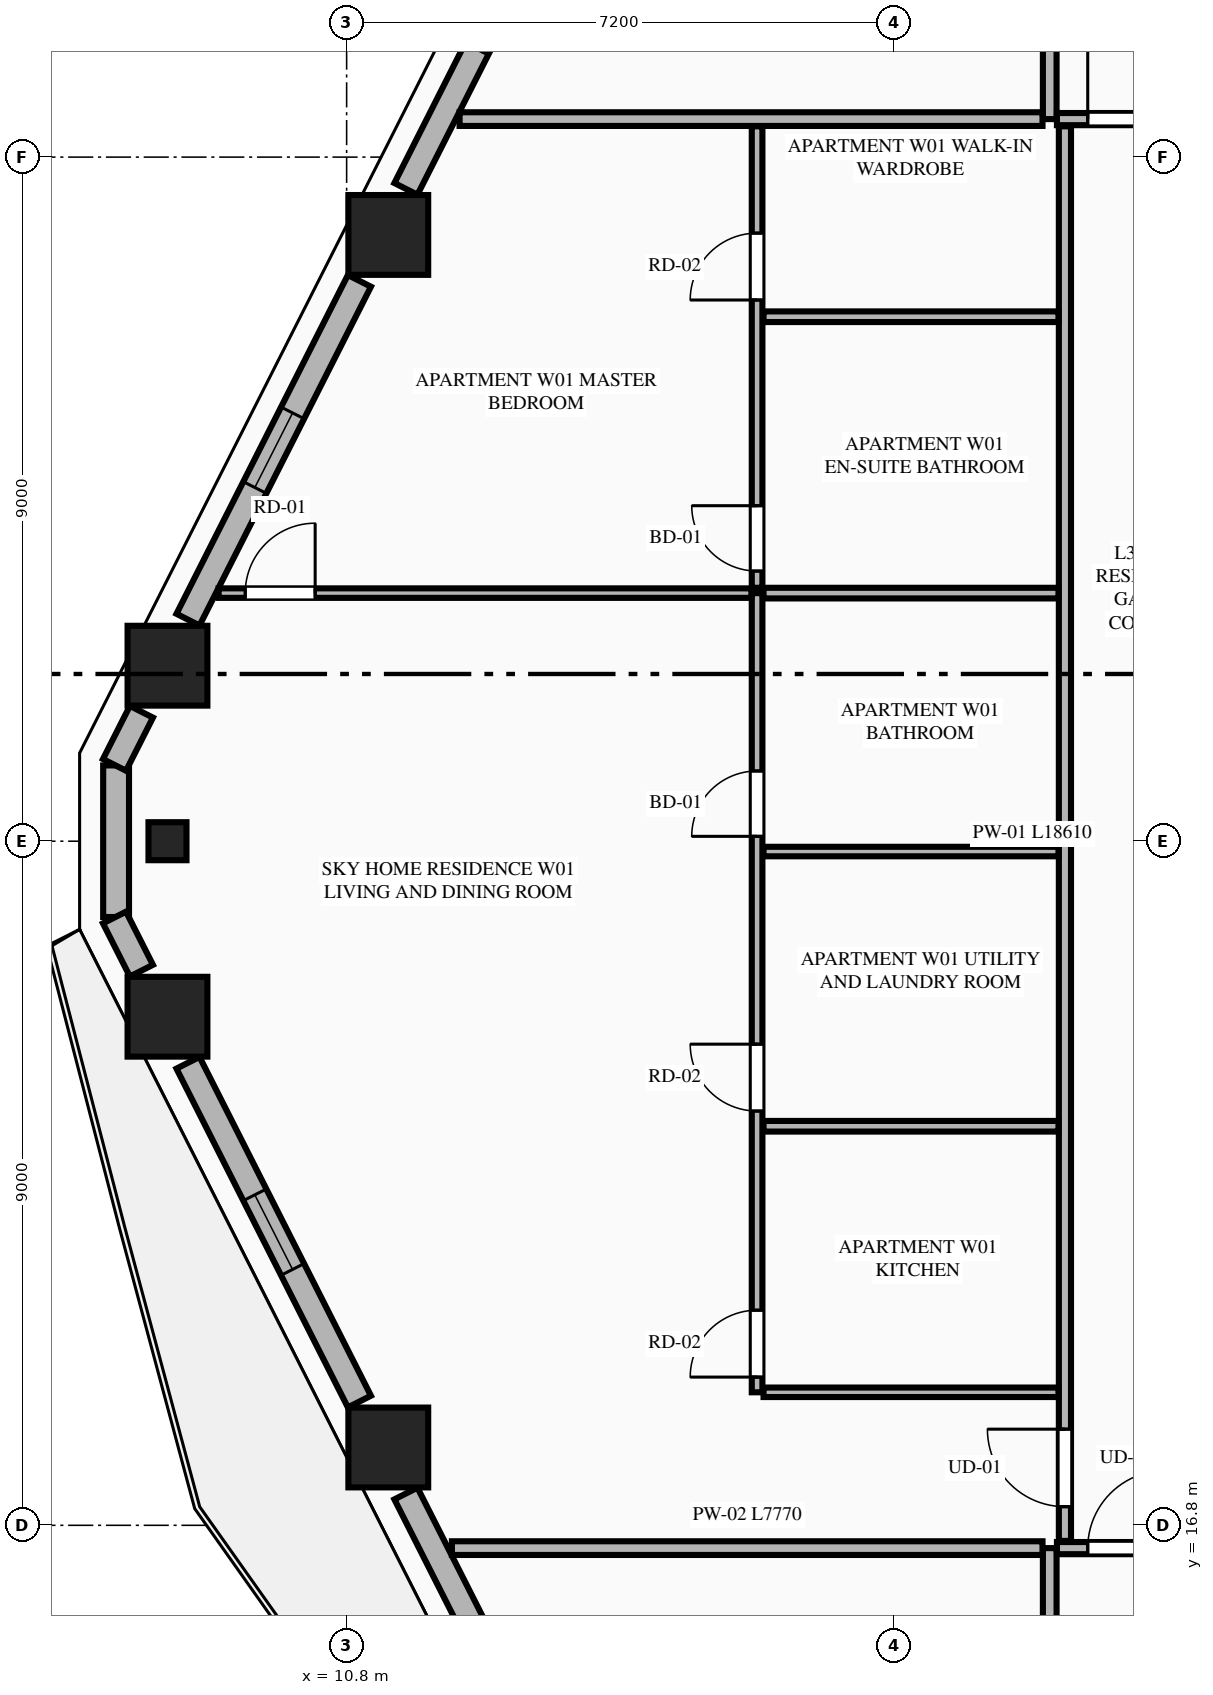
"""IFC4 building model, lengths in metres.
Left out: names, types, materials, properties, quantities, classifications, styles, units other than length and angle.
Written with IfcOpenShell. Run it as: python <this file> out.ifc"""

import sys

from ifc_helpers import new_model, si_unit, direction, frame, frame_2d, origin, origin_2d, place, context, subcontext, project, spatial, rectangle, extrude, element, fill, save


model = new_model("IFC4")
c1 = context("Model", 3, precision=1e-05, world=origin(), true_north=direction((0.0, 1.0)))
c2 = subcontext(c1, "Body", "Model", "MODEL_VIEW")
j1 = project(units=[si_unit("LENGTHUNIT", "METRE"), si_unit("PLANEANGLEUNIT", "RADIAN")], contexts=[c1])
p1 = place(None, origin())
s1 = spatial("IfcSite", under=j1, at=p1, CompositionType="ELEMENT")
p2 = place(p1, origin())
s2 = spatial("IfcBuilding", under=s1, at=p2, CompositionType="ELEMENT")
p3 = place(p2, frame((0.0, 0.0, 130.35)))
s3 = spatial("IfcBuildingStorey", under=s2, at=p3, CompositionType="ELEMENT", Elevation=130.35)
for number, where, z_axis, x_axis in (
    (1, (11.348, 33.776, 0.0), (0.0, 0.0, 1.0), (1.0, 0.0, 0.0)),
    (2, (8.443, 28.109, 0.0), (0.0, 0.0, 1.0), (1.0, 0.0, 0.0)),
    (3, (8.443, 23.491, 0.0), (0.0, 0.0, 1.0), (1.0, 0.0, 0.0)),
    (4, (11.348, 17.824, 0.0), (0.0, 0.0, 1.0), (1.0, 0.0, 0.0)),
):
    element("IfcColumn", number, at=place(p3, frame(where, z_axis=z_axis, x_axis=x_axis)), inside=s3, PredefinedType="COLUMN", context=c2, shape_type="SweptSolid", body=[
        extrude(rectangle(XDim=1.05, YDim=1.05, at=origin_2d()), origin(), (0.0, 0.0, 1.0), 3.55),
    ])
p4 = place(p3, frame((8.443, 25.8, 0.0), z_axis=(0.0, 0.0, 1.0), x_axis=(0.0, -1.0, 0.0)))
e5 = element("IfcColumn", 5, at=p4, inside=s3, PredefinedType="PILASTER", context=c2, shape_type="SweptSolid", body=[
    extrude(rectangle(XDim=0.5, YDim=0.35, at=origin_2d()), origin(), (0.0, 0.0, 1.0), 3.55),
])
p5 = place(p3, frame((7.767, 26.797, 0.0), z_axis=(0.0, 0.0, 1.0), x_axis=(0.0, -1.0, 0.0)))
e6 = element("IfcWall", 6, at=p5, inside=s3, PredefinedType="STANDARD", context=c2, shape_type="SweptSolid", body=[
    extrude(rectangle(XDim=1.994, YDim=0.34, at=frame_2d((0.997, 0.0))), origin(), (0.0, 0.0, 1.0), 3.34),
])
p6 = place(p3, frame((13.937, 39.039, 0.0), z_axis=(0.0, 0.0, 1.0), x_axis=(-0.451567731634, -0.892236842855, 0.0)))
e7 = element("IfcWall", 7, at=p6, inside=s3, PredefinedType="STANDARD", context=c2, shape_type="SweptSolid", body=[
    extrude(rectangle(XDim=5.219, YDim=0.34, at=frame_2d((2.61, 0.0))), origin(), (0.0, 0.0, 1.0), 2.797),
])
p7 = place(p6, frame((2.06, 0.0, 0.75)))
e8 = element("IfcOpeningElement", 8, at=p7, cuts=e7, PredefinedType="OPENING", context=c2, shape_type="SweptSolid", body=[
    extrude(rectangle(XDim=1.1, YDim=1.897, at=frame_2d((0.55, 0.948))), frame((0.0, 0.18, 0.0), z_axis=(0.0, -1.0, 0.0), x_axis=(1.0, 0.0, 0.0)), (0.0, 0.0, 1.0), 0.36),
])
p8 = place(p3, frame((10.968, 33.172, 0.0), z_axis=(0.0, 0.0, 1.0), x_axis=(-0.451470533039, -0.892286029139, 0.0)))
e9 = element("IfcWall", 9, at=p8, inside=s3, PredefinedType="STANDARD", context=c2, shape_type="SweptSolid", body=[
    extrude(rectangle(XDim=4.995, YDim=0.34, at=frame_2d((2.498, 0.0))), origin(), (0.0, 0.0, 1.0), 2.797),
])
p9 = place(p8, frame((1.947, 0.0, 0.75)))
e10 = element("IfcOpeningElement", 10, at=p9, cuts=e9, PredefinedType="OPENING", context=c2, shape_type="SweptSolid", body=[
    extrude(rectangle(XDim=1.1, YDim=1.897, at=frame_2d((0.55, 0.948))), frame((0.0, 0.18, 0.0), z_axis=(0.0, -1.0, 0.0), x_axis=(1.0, 0.0, 0.0)), (0.0, 0.0, 1.0), 0.36),
])
for number, where, z_axis, x_axis in (
    (11, (8.1, 27.503, 0.0), (0.0, 0.0, 1.0), (-0.452, -0.892, 0.0)),
    (12, (7.746, 24.796, 0.0), (0.0, 0.0, 1.0), (0.452, -0.892, 0.0)),
):
    element("IfcWall", number, at=place(p3, frame(where, z_axis=z_axis, x_axis=x_axis)), inside=s3, PredefinedType="STANDARD", context=c2, shape_type="SweptSolid", body=[
        extrude(rectangle(XDim=0.783, YDim=0.34, at=frame_2d((0.392, 0.0))), origin(), (0.0, 0.0, 1.0), 3.34),
    ])
p10 = place(p3, frame((8.713, 22.885, 0.0), z_axis=(0.0, 0.0, 1.0), x_axis=(0.451470533039, -0.892286029139, 0.0)))
e13 = element("IfcWall", 13, at=p10, inside=s3, PredefinedType="STANDARD", context=c2, shape_type="SweptSolid", body=[
    extrude(rectangle(XDim=4.995, YDim=0.34, at=frame_2d((2.498, 0.0))), origin(), (0.0, 0.0, 1.0), 2.797),
])
p11 = place(p10, frame((1.947, 0.0, 0.75)))
e14 = element("IfcOpeningElement", 14, at=p11, cuts=e13, PredefinedType="OPENING", context=c2, shape_type="SweptSolid", body=[
    extrude(rectangle(XDim=1.1, YDim=1.897, at=frame_2d((0.55, 0.948))), frame((0.0, 0.18, 0.0), z_axis=(0.0, -1.0, 0.0), x_axis=(1.0, 0.0, 0.0)), (0.0, 0.0, 1.0), 0.36),
])
p12 = place(p3, frame((11.58, 17.218, 0.0), z_axis=(0.0, 0.0, 1.0), x_axis=(0.451567731634, -0.892236842855, 0.0)))
e15 = element("IfcWall", 15, at=p12, inside=s3, PredefinedType="STANDARD", context=c2, shape_type="SweptSolid", body=[
    extrude(rectangle(XDim=5.219, YDim=0.34, at=frame_2d((2.61, 0.0))), origin(), (0.0, 0.0, 1.0), 2.797),
])
p13 = place(p12, frame((2.587, 0.0, 0.0)))
e16 = element("IfcOpeningElement", 16, at=p13, cuts=e15, PredefinedType="OPENING", context=c2, shape_type="SweptSolid", body=[
    extrude(rectangle(XDim=1.1, YDim=2.25, at=frame_2d((0.55, 1.125))), frame((0.0, 0.18, 0.0), z_axis=(0.0, -1.0, 0.0), x_axis=(1.0, 0.0, 0.0)), (0.0, 0.0, 1.0), 0.36),
])
p14 = place(p3, frame((20.05, 4.105, 0.0), z_axis=(0.0, 0.0, 1.0), x_axis=(0.0, 1.0, 0.0)))
e17 = element("IfcWall", 17, at=p14, inside=s3, PredefinedType="PARTITIONING", context=c2, shape_type="SweptSolid", body=[
    extrude(rectangle(XDim=12.395, YDim=0.18, at=frame_2d((6.198, 0.0))), origin(), (0.0, 0.0, 1.0), 3.34),
])
p15 = place(p3, frame((20.145, 16.5, 0.0), z_axis=(0.0, 0.0, 1.0), x_axis=(1.0, 0.0, 0.0)))
e18 = element("IfcWall", 18, at=p15, inside=s3, PredefinedType="PARTITIONING", context=c2, shape_type="SweptSolid", body=[
    extrude(rectangle(XDim=8.328, YDim=0.16, at=frame_2d((4.164, 0.0))), origin(), (0.0, 0.0, 1.0), 3.34),
])
p16 = place(p15, frame((0.405, 0.0, 0.0)))
e19 = element("IfcOpeningElement", 19, at=p16, cuts=e18, PredefinedType="OPENING", context=c2, shape_type="SweptSolid", body=[
    extrude(rectangle(XDim=1.02, YDim=2.25, at=frame_2d((0.51, 1.125))), frame((0.0, 0.09, 0.0), z_axis=(0.0, -1.0, 0.0), x_axis=(1.0, 0.0, 0.0)), (0.0, 0.0, 1.0), 0.18),
])
p17 = place(p3, frame((20.05, 35.3, 0.0), z_axis=(0.0, 0.0, 1.0), x_axis=(0.0, 1.0, 0.0)))
e20 = element("IfcWall", 20, at=p17, inside=s3, PredefinedType="PARTITIONING", context=c2, shape_type="SweptSolid", body=[
    extrude(rectangle(XDim=12.195, YDim=0.18, at=frame_2d((6.098, 0.0))), origin(), (0.0, 0.0, 1.0), 3.34),
])
p18 = place(p3, frame((20.145, 35.3, 0.0), z_axis=(0.0, 0.0, 1.0), x_axis=(1.0, 0.0, 0.0)))
e21 = element("IfcWall", 21, at=p18, inside=s3, PredefinedType="PARTITIONING", context=c2, shape_type="SweptSolid", body=[
    extrude(rectangle(XDim=24.51, YDim=0.16, at=frame_2d((12.255, 0.0))), origin(), (0.0, 0.0, 1.0), 3.34),
])
p19 = place(p18, frame((0.405, 0.0, 0.0)))
e22 = element("IfcOpeningElement", 22, at=p19, cuts=e21, PredefinedType="OPENING", context=c2, shape_type="SweptSolid", body=[
    extrude(rectangle(XDim=1.35, YDim=2.35, at=frame_2d((0.675, 1.175))), frame((0.0, 0.09, 0.0), z_axis=(0.0, -1.0, 0.0), x_axis=(1.0, 0.0, 0.0)), (0.0, 0.0, 1.0), 0.18),
])
p20 = place(p3, frame((12.185, 16.5, 0.0), z_axis=(0.0, 0.0, 1.0), x_axis=(1.0, 0.0, 0.0)))
e23 = element("IfcWall", 23, at=p20, inside=s3, PredefinedType="PARTITIONING", context=c2, shape_type="SweptSolid", body=[
    extrude(rectangle(XDim=7.77, YDim=0.18, at=frame_2d((3.885, 0.0))), origin(), (0.0, 0.0, 1.0), 3.34),
])
p21 = place(p3, frame((12.286, 35.3, 0.0), z_axis=(0.0, 0.0, 1.0), x_axis=(1.0, 0.0, 0.0)))
e24 = element("IfcWall", 24, at=p21, inside=s3, PredefinedType="PARTITIONING", context=c2, shape_type="SweptSolid", body=[
    extrude(rectangle(XDim=7.669, YDim=0.18, at=frame_2d((3.834, 0.0))), origin(), (0.0, 0.0, 1.0), 3.34),
])
p22 = place(p3, frame((20.25, 16.595, 0.0), z_axis=(0.0, 0.0, 1.0), x_axis=(0.0, 1.0, 0.0)))
e25 = element("IfcWall", 25, at=p22, inside=s3, PredefinedType="PARTITIONING", context=c2, shape_type="SweptSolid", body=[
    extrude(rectangle(XDim=18.61, YDim=0.16, at=frame_2d((9.305, 0.0))), origin(), (0.0, 0.0, 1.0), 3.34),
])
p23 = place(p22, frame((0.45, 0.0, 0.0)))
e26 = element("IfcOpeningElement", 26, at=p23, cuts=e25, PredefinedType="OPENING", context=c2, shape_type="SweptSolid", body=[
    extrude(rectangle(XDim=1.02, YDim=2.25, at=frame_2d((0.51, 1.125))), frame((0.0, 0.09, 0.0), z_axis=(0.0, -1.0, 0.0), x_axis=(1.0, 0.0, 0.0)), (0.0, 0.0, 1.0), 0.18),
])
p24 = place(p3, frame((16.285, 18.55, 0.0), z_axis=(0.0, 0.0, 1.0), x_axis=(1.0, 0.0, 0.0)))
e27 = element("IfcWall", 27, at=p24, inside=s3, PredefinedType="PARTITIONING", context=c2, shape_type="SweptSolid", body=[
    extrude(rectangle(XDim=3.88, YDim=0.125, at=frame_2d((1.94, 0.0))), origin(), (0.0, 0.0, 1.0), 2.722),
])
p25 = place(p3, frame((16.2, 18.55, 0.0), z_axis=(0.0, 0.0, 1.0), x_axis=(0.0, 1.0, 0.0)))
e28 = element("IfcWall", 28, at=p25, inside=s3, PredefinedType="PLUMBINGWALL", context=c2, shape_type="SweptSolid", body=[
    extrude(rectangle(XDim=10.514, YDim=0.14, at=frame_2d((5.257, 0.0))), origin(), (0.0, 0.0, 1.0), 3.34),
])
p26 = place(p25, frame((0.2, 0.0, 0.0)))
e29 = element("IfcOpeningElement", 29, at=p26, cuts=e28, PredefinedType="OPENING", context=c2, shape_type="SweptSolid", body=[
    extrude(rectangle(XDim=0.88, YDim=2.15, at=frame_2d((0.44, 1.075))), frame((0.0, 0.08, 0.0), z_axis=(0.0, -1.0, 0.0), x_axis=(1.0, 0.0, 0.0)), (0.0, 0.0, 1.0), 0.16),
])
p27 = place(p25, frame((3.7, 0.0, 0.0)))
e30 = element("IfcOpeningElement", 30, at=p27, cuts=e28, PredefinedType="OPENING", context=c2, shape_type="SweptSolid", body=[
    extrude(rectangle(XDim=0.88, YDim=2.15, at=frame_2d((0.44, 1.075))), frame((0.0, 0.08, 0.0), z_axis=(0.0, -1.0, 0.0), x_axis=(1.0, 0.0, 0.0)), (0.0, 0.0, 1.0), 0.16),
])
p28 = place(p25, frame((7.314, 0.0, 0.0)))
e31 = element("IfcOpeningElement", 31, at=p28, cuts=e28, PredefinedType="OPENING", context=c2, shape_type="SweptSolid", body=[
    extrude(rectangle(XDim=0.86, YDim=2.1, at=frame_2d((0.43, 1.05))), frame((0.0, 0.08, 0.0), z_axis=(0.0, -1.0, 0.0), x_axis=(1.0, 0.0, 0.0)), (0.0, 0.0, 1.0), 0.16),
])
p29 = place(p3, frame((16.2, 29.134, 0.0), z_axis=(0.0, 0.0, 1.0), x_axis=(0.0, 1.0, 0.0)))
e32 = element("IfcWall", 32, at=p29, inside=s3, PredefinedType="PLUMBINGWALL", context=c2, shape_type="SweptSolid", body=[
    extrude(rectangle(XDim=6.071, YDim=0.14, at=frame_2d((3.036, 0.0))), origin(), (0.0, 0.0, 1.0), 3.34),
])
p30 = place(p29, frame((0.22, 0.0, 0.0)))
e33 = element("IfcOpeningElement", 33, at=p30, cuts=e32, PredefinedType="OPENING", context=c2, shape_type="SweptSolid", body=[
    extrude(rectangle(XDim=0.86, YDim=2.1, at=frame_2d((0.43, 1.05))), frame((0.0, 0.08, 0.0), z_axis=(0.0, -1.0, 0.0), x_axis=(1.0, 0.0, 0.0)), (0.0, 0.0, 1.0), 0.16),
])
p31 = place(p29, frame((3.786, 0.0, 0.0)))
e34 = element("IfcOpeningElement", 34, at=p31, cuts=e32, PredefinedType="OPENING", context=c2, shape_type="SweptSolid", body=[
    extrude(rectangle(XDim=0.88, YDim=2.15, at=frame_2d((0.44, 1.075))), frame((0.0, 0.08, 0.0), z_axis=(0.0, -1.0, 0.0), x_axis=(1.0, 0.0, 0.0)), (0.0, 0.0, 1.0), 0.16),
])
p32 = place(p3, frame((16.285, 29.064, 0.0), z_axis=(0.0, 0.0, 1.0), x_axis=(1.0, 0.0, 0.0)))
e35 = element("IfcWall", 35, at=p32, inside=s3, PredefinedType="PLUMBINGWALL", context=c2, shape_type="SweptSolid", body=[
    extrude(rectangle(XDim=3.88, YDim=0.14, at=frame_2d((1.94, 0.0))), origin(), (0.0, 0.0, 1.0), 3.34),
])
p33 = place(p3, frame((9.116, 29.064, 0.0), z_axis=(0.0, 0.0, 1.0), x_axis=(1.0, 0.0, 0.0)))
e36 = element("IfcWall", 36, at=p33, inside=s3, PredefinedType="PARTITIONING", context=c2, shape_type="SweptSolid", body=[
    extrude(rectangle(XDim=7.009, YDim=0.125, at=frame_2d((3.504, 0.0))), origin(), (0.0, 0.0, 1.0), 3.34),
])
p34 = place(p33, frame((0.35, 0.0, 0.0)))
e37 = element("IfcOpeningElement", 37, at=p34, cuts=e36, PredefinedType="OPENING", context=c2, shape_type="SweptSolid", body=[
    extrude(rectangle(XDim=0.92, YDim=2.15, at=frame_2d((0.46, 1.075))), frame((0.0, 0.073, 0.0), z_axis=(0.0, -1.0, 0.0), x_axis=(1.0, 0.0, 0.0)), (0.0, 0.0, 1.0), 0.145),
])
p35 = place(p3, frame((16.285, 22.05, 0.0), z_axis=(0.0, 0.0, 1.0), x_axis=(1.0, 0.0, 0.0)))
e38 = element("IfcWall", 38, at=p35, inside=s3, PredefinedType="PLUMBINGWALL", context=c2, shape_type="SweptSolid", body=[
    extrude(rectangle(XDim=3.88, YDim=0.14, at=frame_2d((1.94, 0.0))), origin(), (0.0, 0.0, 1.0), 3.34),
])
p36 = place(p3, frame((16.285, 25.664, 0.0), z_axis=(0.0, 0.0, 1.0), x_axis=(1.0, 0.0, 0.0)))
e39 = element("IfcWall", 39, at=p36, inside=s3, PredefinedType="PARTITIONING", context=c2, shape_type="SweptSolid", body=[
    extrude(rectangle(XDim=3.88, YDim=0.125, at=frame_2d((1.94, 0.0))), origin(), (0.0, 0.0, 1.0), 3.34),
])
p37 = place(p3, frame((16.285, 32.7, 0.0), z_axis=(0.0, 0.0, 1.0), x_axis=(1.0, 0.0, 0.0)))
e40 = element("IfcWall", 40, at=p37, inside=s3, PredefinedType="PLUMBINGWALL", context=c2, shape_type="SweptSolid", body=[
    extrude(rectangle(XDim=3.88, YDim=0.14, at=frame_2d((1.94, 0.0))), origin(), (0.0, 0.0, 1.0), 3.34),
])
p38 = place(p9, origin())
e41 = element("IfcWindow", 41, at=p38, inside=s3, PartitioningType="SINGLE_PANEL", PredefinedType="WINDOW", context=c2, shape_type="SweptSolid", body=[
    extrude(rectangle(XDim=1.1, YDim=1.897, at=frame_2d((0.55, 0.948))), frame((0.0, 0.03, 0.0), z_axis=(0.0, -1.0, 0.0), x_axis=(1.0, 0.0, 0.0)), (0.0, 0.0, 1.0), 0.06),
])
fill(e10, e41)
p39 = place(p11, origin())
e42 = element("IfcWindow", 42, at=p39, inside=s3, PartitioningType="SINGLE_PANEL", PredefinedType="WINDOW", context=c2, shape_type="SweptSolid", body=[
    extrude(rectangle(XDim=1.1, YDim=1.897, at=frame_2d((0.55, 0.948))), frame((0.0, 0.03, 0.0), z_axis=(0.0, -1.0, 0.0), x_axis=(1.0, 0.0, 0.0)), (0.0, 0.0, 1.0), 0.06),
])
fill(e14, e42)
p40 = place(p16, origin())
e43 = element("IfcDoor", 43, at=p40, inside=s3, OperationType="SINGLE_SWING_RIGHT", PredefinedType="DOOR", context=c2, shape_type="SweptSolid", body=[
    extrude(rectangle(XDim=1.02, YDim=2.25, at=frame_2d((0.51, 1.125))), frame((0.0, 0.025, 0.0), z_axis=(0.0, -1.0, 0.0), x_axis=(1.0, 0.0, 0.0)), (0.0, 0.0, 1.0), 0.05),
])
fill(e19, e43)
p41 = place(p19, origin())
e44 = element("IfcDoor", 44, at=p41, inside=s3, OperationType="SINGLE_SWING_LEFT", PredefinedType="DOOR", context=c2, shape_type="SweptSolid", body=[
    extrude(rectangle(XDim=1.35, YDim=2.35, at=frame_2d((0.675, 1.175))), frame((0.0, 0.025, 0.0), z_axis=(0.0, -1.0, 0.0), x_axis=(1.0, 0.0, 0.0)), (0.0, 0.0, 1.0), 0.05),
])
fill(e22, e44)
p42 = place(p26, origin())
e45 = element("IfcDoor", 45, at=p42, inside=s3, OperationType="SINGLE_SWING_LEFT", PredefinedType="DOOR", context=c2, shape_type="SweptSolid", body=[
    extrude(rectangle(XDim=0.88, YDim=2.15, at=frame_2d((0.44, 1.075))), frame((0.0, 0.025, 0.0), z_axis=(0.0, -1.0, 0.0), x_axis=(1.0, 0.0, 0.0)), (0.0, 0.0, 1.0), 0.05),
])
fill(e29, e45)
p43 = place(p27, origin())
e46 = element("IfcDoor", 46, at=p43, inside=s3, OperationType="SINGLE_SWING_RIGHT", PredefinedType="DOOR", context=c2, shape_type="SweptSolid", body=[
    extrude(rectangle(XDim=0.88, YDim=2.15, at=frame_2d((0.44, 1.075))), frame((0.0, 0.025, 0.0), z_axis=(0.0, -1.0, 0.0), x_axis=(1.0, 0.0, 0.0)), (0.0, 0.0, 1.0), 0.05),
])
fill(e30, e46)
p44 = place(p28, origin())
e47 = element("IfcDoor", 47, at=p44, inside=s3, OperationType="SINGLE_SWING_LEFT", PredefinedType="DOOR", context=c2, shape_type="SweptSolid", body=[
    extrude(rectangle(XDim=0.86, YDim=2.1, at=frame_2d((0.43, 1.05))), frame((0.0, 0.025, 0.0), z_axis=(0.0, -1.0, 0.0), x_axis=(1.0, 0.0, 0.0)), (0.0, 0.0, 1.0), 0.05),
])
fill(e31, e47)
p45 = place(p30, origin())
e48 = element("IfcDoor", 48, at=p45, inside=s3, OperationType="SINGLE_SWING_RIGHT", PredefinedType="DOOR", context=c2, shape_type="SweptSolid", body=[
    extrude(rectangle(XDim=0.86, YDim=2.1, at=frame_2d((0.43, 1.05))), frame((0.0, 0.025, 0.0), z_axis=(0.0, -1.0, 0.0), x_axis=(1.0, 0.0, 0.0)), (0.0, 0.0, 1.0), 0.05),
])
fill(e33, e48)
p46 = place(p31, origin())
e49 = element("IfcDoor", 49, at=p46, inside=s3, OperationType="SINGLE_SWING_LEFT", PredefinedType="DOOR", context=c2, shape_type="SweptSolid", body=[
    extrude(rectangle(XDim=0.88, YDim=2.15, at=frame_2d((0.44, 1.075))), frame((0.0, 0.025, 0.0), z_axis=(0.0, -1.0, 0.0), x_axis=(1.0, 0.0, 0.0)), (0.0, 0.0, 1.0), 0.05),
])
fill(e34, e49)
p47 = place(p23, origin())
e50 = element("IfcDoor", 50, at=p47, inside=s3, OperationType="SINGLE_SWING_RIGHT", PredefinedType="DOOR", context=c2, shape_type="SweptSolid", body=[
    extrude(rectangle(XDim=1.02, YDim=2.25, at=frame_2d((0.51, 1.125))), frame((0.0, 0.025, 0.0), z_axis=(0.0, -1.0, 0.0), x_axis=(1.0, 0.0, 0.0)), (0.0, 0.0, 1.0), 0.05),
])
fill(e26, e50)
p48 = place(p34, origin())
e51 = element("IfcDoor", 51, at=p48, inside=s3, OperationType="SINGLE_SWING_RIGHT", PredefinedType="DOOR", context=c2, shape_type="SweptSolid", body=[
    extrude(rectangle(XDim=0.92, YDim=2.15, at=frame_2d((0.46, 1.075))), frame((0.0, 0.025, 0.0), z_axis=(0.0, -1.0, 0.0), x_axis=(1.0, 0.0, 0.0)), (0.0, 0.0, 1.0), 0.05),
])
fill(e37, e51)
save(model, sys.argv[1])
